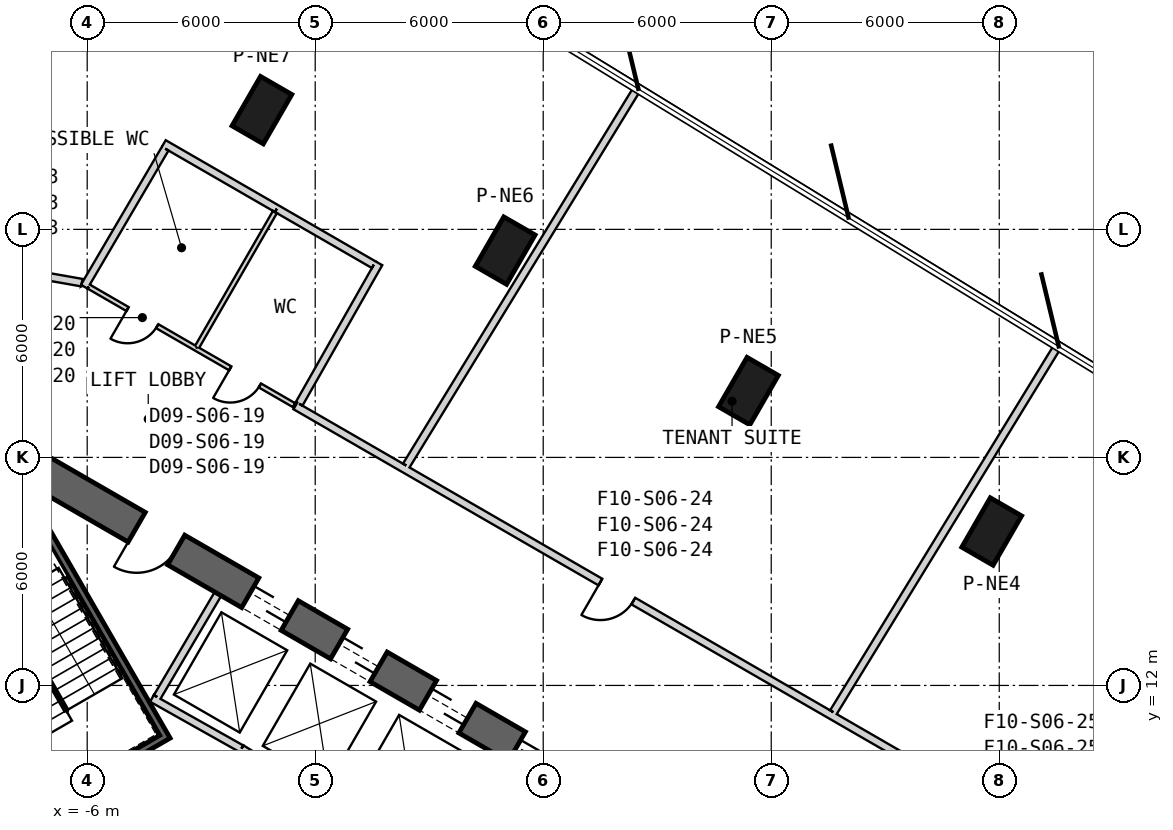
"""IFC4 building model, lengths in metres.
Left out: names, types, materials, properties, quantities, classifications, styles, units other than length and angle.
Written with IfcOpenShell. Run it as: python <this file> out.ifc"""

import sys

from ifc_helpers import new_model, si_unit, direction, frame, frame_2d, origin, origin_2d, place, context, subcontext, project, spatial, rectangle, extrude, element, fill, save


model = new_model("IFC4")
c1 = context("Model", 3, precision=1e-05, world=origin(), true_north=direction((0.0, 1.0)))
c2 = subcontext(c1, "Body", "Model", "MODEL_VIEW")
j1 = project(units=[si_unit("LENGTHUNIT", "METRE"), si_unit("PLANEANGLEUNIT", "RADIAN")], contexts=[c1])
p1 = place(None, origin())
s1 = spatial("IfcSite", under=j1, at=p1, CompositionType="ELEMENT")
p2 = place(p1, origin())
s2 = spatial("IfcBuilding", under=s1, at=p2, CompositionType="ELEMENT")
p3 = place(p2, frame((0.0, 0.0, 119.3)))
s3 = spatial("IfcBuildingStorey", under=s2, at=p3, CompositionType="ELEMENT", Elevation=119.3)
for number, where, z_axis, x_axis in (
    (1, (17.801, 16.05, 0.0), (0.0, 0.0, 1.0), (0.5, 0.866, 0.0)),
    (2, (11.4, 19.746, 0.0), (0.0, 0.0, 1.0), (0.5, 0.866, 0.0)),
    (3, (4.999, 23.441, 0.0), (0.0, 0.0, 1.0), (0.5, 0.866, 0.0)),
    (4, (-1.402, 27.137, 0.0), (0.0, 0.0, 1.0), (0.5, 0.866, 0.0)),
):
    element("IfcColumn", number, at=place(p3, frame(where, z_axis=z_axis, x_axis=x_axis)), inside=s3, PredefinedType="COLUMN", context=c2, shape_type="SweptSolid", body=[
        extrude(rectangle(XDim=1.5, YDim=0.95, at=origin_2d()), origin(), (0.0, 0.0, 1.0), 4.1),
    ])
p4 = place(p3, frame((19.475, 2.208, 0.0), z_axis=(0.0, 0.0, 1.0), x_axis=(-0.866028369851, 0.499994862586, 0.0)))
e5 = element("IfcWall", 5, at=p4, inside=s3, PredefinedType="SHEAR", context=c2, shape_type="SweptSolid", body=[
    extrude(rectangle(XDim=31.523, YDim=0.9, at=frame_2d((15.762, 0.0))), origin(), (0.0, 0.0, 1.0), 4.1),
])
p5 = place(p4, frame((7.062, 0.0, 0.0)))
e6 = element("IfcOpeningElement", 6, at=p5, cuts=e5, PredefinedType="OPENING", context=c2, shape_type="SweptSolid", body=[
    extrude(rectangle(XDim=1.2, YDim=2.4, at=frame_2d((0.6, 1.2))), frame((0.0, 0.46, 0.0), z_axis=(0.0, -1.0, 0.0), x_axis=(1.0, 0.0, 0.0)), (0.0, 0.0, 1.0), 0.92),
])
p6 = place(p4, frame((9.762, 0.0, 0.0)))
e7 = element("IfcOpeningElement", 7, at=p6, cuts=e5, PredefinedType="OPENING", context=c2, shape_type="SweptSolid", body=[
    extrude(rectangle(XDim=1.2, YDim=2.4, at=frame_2d((0.6, 1.2))), frame((0.0, 0.46, 0.0), z_axis=(0.0, -1.0, 0.0), x_axis=(1.0, 0.0, 0.0)), (0.0, 0.0, 1.0), 0.92),
])
p7 = place(p4, frame((12.462, 0.0, 0.0)))
e8 = element("IfcOpeningElement", 8, at=p7, cuts=e5, PredefinedType="OPENING", context=c2, shape_type="SweptSolid", body=[
    extrude(rectangle(XDim=1.2, YDim=2.4, at=frame_2d((0.6, 1.2))), frame((0.0, 0.46, 0.0), z_axis=(0.0, -1.0, 0.0), x_axis=(1.0, 0.0, 0.0)), (0.0, 0.0, 1.0), 0.92),
])
p8 = place(p4, frame((15.162, 0.0, 0.0)))
e9 = element("IfcOpeningElement", 9, at=p8, cuts=e5, PredefinedType="OPENING", context=c2, shape_type="SweptSolid", body=[
    extrude(rectangle(XDim=1.2, YDim=2.4, at=frame_2d((0.6, 1.2))), frame((0.0, 0.46, 0.0), z_axis=(0.0, -1.0, 0.0), x_axis=(1.0, 0.0, 0.0)), (0.0, 0.0, 1.0), 0.92),
])
p9 = place(p4, frame((17.862, 0.0, 0.0)))
e10 = element("IfcOpeningElement", 10, at=p9, cuts=e5, PredefinedType="OPENING", context=c2, shape_type="SweptSolid", body=[
    extrude(rectangle(XDim=1.2, YDim=2.4, at=frame_2d((0.6, 1.2))), frame((0.0, 0.46, 0.0), z_axis=(0.0, -1.0, 0.0), x_axis=(1.0, 0.0, 0.0)), (0.0, 0.0, 1.0), 0.92),
])
p10 = place(p4, frame((20.562, 0.0, 0.0)))
e11 = element("IfcOpeningElement", 11, at=p10, cuts=e5, PredefinedType="OPENING", context=c2, shape_type="SweptSolid", body=[
    extrude(rectangle(XDim=1.2, YDim=2.4, at=frame_2d((0.6, 1.2))), frame((0.0, 0.46, 0.0), z_axis=(0.0, -1.0, 0.0), x_axis=(1.0, 0.0, 0.0)), (0.0, 0.0, 1.0), 0.92),
])
p11 = place(p4, frame((23.262, 0.0, 0.0)))
e12 = element("IfcOpeningElement", 12, at=p11, cuts=e5, PredefinedType="OPENING", context=c2, shape_type="SweptSolid", body=[
    extrude(rectangle(XDim=1.2, YDim=2.4, at=frame_2d((0.6, 1.2))), frame((0.0, 0.46, 0.0), z_axis=(0.0, -1.0, 0.0), x_axis=(1.0, 0.0, 0.0)), (0.0, 0.0, 1.0), 0.92),
])
p12 = place(p4, frame((3.612, 0.0, 0.0)))
e13 = element("IfcOpeningElement", 13, at=p12, cuts=e5, PredefinedType="OPENING", context=c2, shape_type="SweptSolid", body=[
    extrude(rectangle(XDim=1.2, YDim=2.4, at=frame_2d((0.6, 1.2))), frame((0.0, 0.46, 0.0), z_axis=(0.0, -1.0, 0.0), x_axis=(1.0, 0.0, 0.0)), (0.0, 0.0, 1.0), 0.92),
])
p13 = place(p4, frame((26.712, 0.0, 0.0)))
e14 = element("IfcOpeningElement", 14, at=p13, cuts=e5, PredefinedType="OPENING", context=c2, shape_type="SweptSolid", body=[
    extrude(rectangle(XDim=1.2, YDim=2.4, at=frame_2d((0.6, 1.2))), frame((0.0, 0.46, 0.0), z_axis=(0.0, -1.0, 0.0), x_axis=(1.0, 0.0, 0.0)), (0.0, 0.0, 1.0), 0.92),
])
p14 = place(p3, frame((-1.941, 10.339, 0.0), z_axis=(0.0, 0.0, 1.0), x_axis=(0.850216889117, -0.526432561171, 0.0)))
e15 = element("IfcWall", 15, at=p14, inside=s3, PredefinedType="PLUMBINGWALL", context=c2, shape_type="SweptSolid", body=[
    extrude(rectangle(XDim=1.078, YDim=0.2, at=frame_2d((0.539, 0.0))), origin(), (0.0, 0.0, 1.0), 3.8),
])
p15 = place(p3, frame((-4.296, 11.659, 0.0), z_axis=(0.0, 0.0, 1.0), x_axis=(0.871534483978, -0.490334215854, 0.0)))
e16 = element("IfcWall", 16, at=p15, inside=s3, PredefinedType="PLUMBINGWALL", context=c2, shape_type="SweptSolid", body=[
    extrude(rectangle(XDim=2.7, YDim=0.2, at=frame_2d((1.35, 0.0))), origin(), (0.0, 0.0, 1.0), 3.8),
])
p16 = place(p3, frame((-4.158, 11.696, 0.0), z_axis=(0.0, 0.0, 1.0), x_axis=(0.508018930956, 0.861345903683, 0.0)))
e17 = element("IfcWall", 17, at=p16, inside=s3, PredefinedType="PLUMBINGWALL", context=c2, shape_type="SweptSolid", body=[
    extrude(rectangle(XDim=3.15, YDim=0.2, at=frame_2d((1.575, 0.0))), origin(), (0.0, 0.0, 1.0), 3.8),
])
p17 = place(p3, frame((-7.854, 17.405, -0.3), z_axis=(0.0, 0.0, 1.0), x_axis=(0.499997992926, -0.866026562566, 0.0)))
e18 = element("IfcWall", 18, at=p17, inside=s3, PredefinedType="SHEAR", context=c2, shape_type="SweptSolid", body=[
    extrude(rectangle(XDim=7.9, YDim=0.2, at=frame_2d((3.95, 0.0))), origin(), (0.0, 0.0, 1.0), 4.1),
])
p18 = place(p3, frame((-7.159, 8.8, -0.3), z_axis=(0.0, 0.0, 1.0), x_axis=(0.866047807691, 0.499961193289, 0.0)))
e19 = element("IfcWall", 19, at=p18, inside=s3, PredefinedType="SHEAR", context=c2, shape_type="SweptSolid", body=[
    extrude(rectangle(XDim=3.6, YDim=0.2, at=frame_2d((1.8, 0.0))), origin(), (0.0, 0.0, 1.0), 4.1),
])
p19 = place(p18, frame((1.25, 0.0, 0.3)))
e20 = element("IfcOpeningElement", 20, at=p19, cuts=e19, PredefinedType="OPENING", context=c2, shape_type="SweptSolid", body=[
    extrude(rectangle(XDim=1.1, YDim=2.1, at=frame_2d((0.55, 1.05))), frame((0.0, 0.11, 0.0), z_axis=(0.0, -1.0, 0.0), x_axis=(1.0, 0.0, 0.0)), (0.0, 0.0, 1.0), 0.22),
])
p20 = place(p3, frame((-6.141, 22.598, 0.0), z_axis=(0.0, 0.0, 1.0), x_axis=(-0.984804622474, 0.173665930897, 0.0)))
e21 = element("IfcWall", 21, at=p20, inside=s3, PredefinedType="PARTITIONING", context=c2, shape_type="SweptSolid", body=[
    extrude(rectangle(XDim=4.316, YDim=0.2, at=frame_2d((2.158, 0.0))), origin(), (0.0, 0.0, 1.0), 2.88),
])
p21 = place(p20, frame((1.658, 0.0, 0.0)))
e22 = element("IfcOpeningElement", 22, at=p21, cuts=e21, PredefinedType="OPENING", context=c2, shape_type="SweptSolid", body=[
    extrude(rectangle(XDim=1.0, YDim=2.1, at=frame_2d((0.5, 1.05))), frame((0.0, 0.11, 0.0), z_axis=(0.0, -1.0, 0.0), x_axis=(1.0, 0.0, 0.0)), (0.0, 0.0, 1.0), 0.22),
])
p22 = place(p3, frame((22.727, 5.931, 0.0), z_axis=(0.0, 0.0, 1.0), x_axis=(-0.866024609098, 0.500001376435, 0.0)))
e23 = element("IfcWall", 23, at=p22, inside=s3, PredefinedType="PARTITIONING", context=c2, shape_type="SweptSolid", body=[
    extrude(rectangle(XDim=26.847, YDim=0.2, at=frame_2d((13.424, 0.0))), origin(), (0.0, 0.0, 1.0), 2.98),
])
p23 = place(p22, frame((16.578, 0.0, 0.0)))
e24 = element("IfcOpeningElement", 24, at=p23, cuts=e23, PredefinedType="OPENING", context=c2, shape_type="SweptSolid", body=[
    extrude(rectangle(XDim=1.0, YDim=2.1, at=frame_2d((0.5, 1.05))), frame((0.0, 0.11, 0.0), z_axis=(0.0, -1.0, 0.0), x_axis=(1.0, 0.0, 0.0)), (0.0, 0.0, 1.0), 0.22),
])
p24 = place(p22, frame((4.829, 0.0, 0.0)))
e25 = element("IfcOpeningElement", 25, at=p24, cuts=e23, PredefinedType="OPENING", context=c2, shape_type="SweptSolid", body=[
    extrude(rectangle(XDim=1.0, YDim=2.1, at=frame_2d((0.5, 1.05))), frame((0.0, 0.11, 0.0), z_axis=(0.0, -1.0, 0.0), x_axis=(1.0, 0.0, 0.0)), (0.0, 0.0, 1.0), 0.22),
])
p25 = place(p3, frame((-0.557, 19.375, 0.0), z_axis=(0.0, 0.0, 1.0), x_axis=(-0.866028486751, 0.499994660107, 0.0)))
e26 = element("IfcWall", 26, at=p25, inside=s3, PredefinedType="PARTITIONING", context=c2, shape_type="SweptSolid", body=[
    extrude(rectangle(XDim=2.976, YDim=0.12, at=frame_2d((1.488, 0.0))), origin(), (0.0, 0.0, 1.0), 3.08),
])
p26 = place(p25, frame((1.038, 0.0, 0.0)))
e27 = element("IfcOpeningElement", 27, at=p26, cuts=e26, PredefinedType="OPENING", context=c2, shape_type="SweptSolid", body=[
    extrude(rectangle(XDim=0.9, YDim=2.1, at=frame_2d((0.45, 1.05))), frame((0.0, 0.07, 0.0), z_axis=(0.0, -1.0, 0.0), x_axis=(1.0, 0.0, 0.0)), (0.0, 0.0, 1.0), 0.14),
])
p27 = place(p3, frame((-3.135, 20.863, 0.0), z_axis=(0.0, 0.0, 1.0), x_axis=(-0.866043587326, 0.49996850386, 0.0)))
e28 = element("IfcWall", 28, at=p27, inside=s3, PredefinedType="PARTITIONING", context=c2, shape_type="SweptSolid", body=[
    extrude(rectangle(XDim=3.264, YDim=0.12, at=frame_2d((1.632, 0.0))), origin(), (0.0, 0.0, 1.0), 2.98),
])
p28 = place(p27, frame((1.182, 0.0, 0.0)))
e29 = element("IfcOpeningElement", 29, at=p28, cuts=e28, PredefinedType="OPENING", context=c2, shape_type="SweptSolid", body=[
    extrude(rectangle(XDim=0.9, YDim=2.1, at=frame_2d((0.45, 1.05))), frame((0.0, 0.07, 0.0), z_axis=(0.0, -1.0, 0.0), x_axis=(1.0, 0.0, 0.0)), (0.0, 0.0, 1.0), 0.14),
])
p29 = place(p3, frame((2.395, 17.785, 0.0), z_axis=(0.0, 0.0, 1.0), x_axis=(0.522409107214, 0.852694977527, 0.0)))
e30 = element("IfcWall", 30, at=p29, inside=s3, PredefinedType="PARTITIONING", context=c2, shape_type="SweptSolid", body=[
    extrude(rectangle(XDim=11.641, YDim=0.2, at=frame_2d((5.821, 0.0))), origin(), (0.0, 0.0, 1.0), 3.08),
])
p30 = place(p3, frame((-0.421, 19.411, 0.0), z_axis=(0.0, 0.0, 1.0), x_axis=(0.493854448618, 0.86954458401, 0.0)))
e31 = element("IfcWall", 31, at=p30, inside=s3, PredefinedType="PARTITIONING", context=c2, shape_type="SweptSolid", body=[
    extrude(rectangle(XDim=4.25, YDim=0.2, at=frame_2d((2.125, 0.0))), origin(), (0.0, 0.0, 1.0), 3.8),
])
p31 = place(p3, frame((-3.984, 26.26, 0.0), z_axis=(0.0, 0.0, 1.0), x_axis=(0.866016279763, -0.500015802937, 0.0)))
e32 = element("IfcWall", 32, at=p31, inside=s3, PredefinedType="PARTITIONING", context=c2, shape_type="SweptSolid", body=[
    extrude(rectangle(XDim=3.434, YDim=0.2, at=frame_2d((1.717, 0.0))), origin(), (0.0, 0.0, 1.0), 3.08),
])
p32 = place(p3, frame((-1.01, 24.543, 0.0), z_axis=(0.0, 0.0, 1.0), x_axis=(0.866036539348, -0.499980712142, 0.0)))
e33 = element("IfcWall", 33, at=p32, inside=s3, PredefinedType="PARTITIONING", context=c2, shape_type="SweptSolid", body=[
    extrude(rectangle(XDim=2.946, YDim=0.2, at=frame_2d((1.473, 0.0))), origin(), (0.0, 0.0, 1.0), 3.8),
])
p33 = place(p3, frame((-6.078, 22.493, 0.0), z_axis=(0.0, 0.0, 1.0), x_axis=(0.506079610092, 0.862486769898, 0.0)))
e34 = element("IfcWall", 34, at=p33, inside=s3, PredefinedType="PARTITIONING", context=c2, shape_type="SweptSolid", body=[
    extrude(rectangle(XDim=4.21, YDim=0.2, at=frame_2d((2.105, 0.0))), origin(), (0.0, 0.0, 1.0), 2.98),
])
p34 = place(p3, frame((19.541, 20.933, 0.0), z_axis=(0.0, 0.0, 1.0), x_axis=(-0.522401997829, -0.852699333097, 0.0)))
e35 = element("IfcWall", 35, at=p34, inside=s3, PredefinedType="PARTITIONING", context=c2, shape_type="SweptSolid", body=[
    extrude(rectangle(XDim=11.303, YDim=0.2, at=frame_2d((5.652, 0.0))), origin(), (0.0, 0.0, 1.0), 3.08),
])
p35 = place(p3, frame((-3.105, 20.914, 0.0), z_axis=(0.0, 0.0, 1.0), x_axis=(0.499965302165, 0.866045435662, 0.0)))
e36 = element("IfcWall", 36, at=p35, inside=s3, PredefinedType="PARTITIONING", context=c2, shape_type="SweptSolid", body=[
    extrude(rectangle(XDim=4.09, YDim=0.12, at=frame_2d((2.045, 0.0))), origin(), (0.0, 0.0, 1.0), 3.08),
])
p36 = place(p26, origin())
e37 = element("IfcDoor", 37, at=p36, inside=s3, OperationType="SINGLE_SWING_RIGHT", PredefinedType="NOTDEFINED", context=c2, shape_type="SweptSolid", body=[
    extrude(rectangle(XDim=0.9, YDim=2.1, at=frame_2d((0.45, 1.05))), frame((0.0, 0.025, 0.0), z_axis=(0.0, -1.0, 0.0), x_axis=(1.0, 0.0, 0.0)), (0.0, 0.0, 1.0), 0.05),
])
fill(e27, e37)
p37 = place(p28, origin())
e38 = element("IfcDoor", 38, at=p37, inside=s3, OperationType="SINGLE_SWING_RIGHT", PredefinedType="NOTDEFINED", context=c2, shape_type="SweptSolid", body=[
    extrude(rectangle(XDim=0.9, YDim=2.1, at=frame_2d((0.45, 1.05))), frame((0.0, 0.025, 0.0), z_axis=(0.0, -1.0, 0.0), x_axis=(1.0, 0.0, 0.0)), (0.0, 0.0, 1.0), 0.05),
])
fill(e29, e38)
p38 = place(p23, origin())
e39 = element("IfcDoor", 39, at=p38, inside=s3, OperationType="SINGLE_SWING_LEFT", PredefinedType="USERDEFINED", context=c2, shape_type="SweptSolid", body=[
    extrude(rectangle(XDim=1.0, YDim=2.1, at=frame_2d((0.5, 1.05))), frame((0.0, 0.025, 0.0), z_axis=(0.0, -1.0, 0.0), x_axis=(1.0, 0.0, 0.0)), (0.0, 0.0, 1.0), 0.05),
])
fill(e24, e39)
p39 = place(p8, origin())
e40 = element("IfcDoor", 40, at=p39, inside=s3, OperationType="SLIDING_TO_LEFT", PredefinedType="USERDEFINED", context=c2, shape_type="SweptSolid", body=[
    extrude(rectangle(XDim=1.2, YDim=2.4, at=frame_2d((0.6, 1.2))), frame((0.0, 0.025, 0.0), z_axis=(0.0, -1.0, 0.0), x_axis=(1.0, 0.0, 0.0)), (0.0, 0.0, 1.0), 0.05),
])
fill(e9, e40)
p40 = place(p9, origin())
e41 = element("IfcDoor", 41, at=p40, inside=s3, OperationType="SLIDING_TO_LEFT", PredefinedType="USERDEFINED", context=c2, shape_type="SweptSolid", body=[
    extrude(rectangle(XDim=1.2, YDim=2.4, at=frame_2d((0.6, 1.2))), frame((0.0, 0.025, 0.0), z_axis=(0.0, -1.0, 0.0), x_axis=(1.0, 0.0, 0.0)), (0.0, 0.0, 1.0), 0.05),
])
fill(e10, e41)
p41 = place(p10, origin())
e42 = element("IfcDoor", 42, at=p41, inside=s3, OperationType="SLIDING_TO_LEFT", PredefinedType="USERDEFINED", context=c2, shape_type="SweptSolid", body=[
    extrude(rectangle(XDim=1.2, YDim=2.4, at=frame_2d((0.6, 1.2))), frame((0.0, 0.025, 0.0), z_axis=(0.0, -1.0, 0.0), x_axis=(1.0, 0.0, 0.0)), (0.0, 0.0, 1.0), 0.05),
])
fill(e11, e42)
p42 = place(p11, origin())
e43 = element("IfcDoor", 43, at=p42, inside=s3, OperationType="SLIDING_TO_LEFT", PredefinedType="USERDEFINED", context=c2, shape_type="SweptSolid", body=[
    extrude(rectangle(XDim=1.2, YDim=2.4, at=frame_2d((0.6, 1.2))), frame((0.0, 0.025, 0.0), z_axis=(0.0, -1.0, 0.0), x_axis=(1.0, 0.0, 0.0)), (0.0, 0.0, 1.0), 0.05),
])
fill(e12, e43)
p43 = place(p13, origin())
e44 = element("IfcDoor", 44, at=p43, inside=s3, OperationType="SINGLE_SWING_LEFT", PredefinedType="USERDEFINED", context=c2, shape_type="SweptSolid", body=[
    extrude(rectangle(XDim=1.2, YDim=2.4, at=frame_2d((0.6, 1.2))), frame((0.0, 0.025, 0.0), z_axis=(0.0, -1.0, 0.0), x_axis=(1.0, 0.0, 0.0)), (0.0, 0.0, 1.0), 0.05),
])
fill(e14, e44)
save(model, sys.argv[1])
